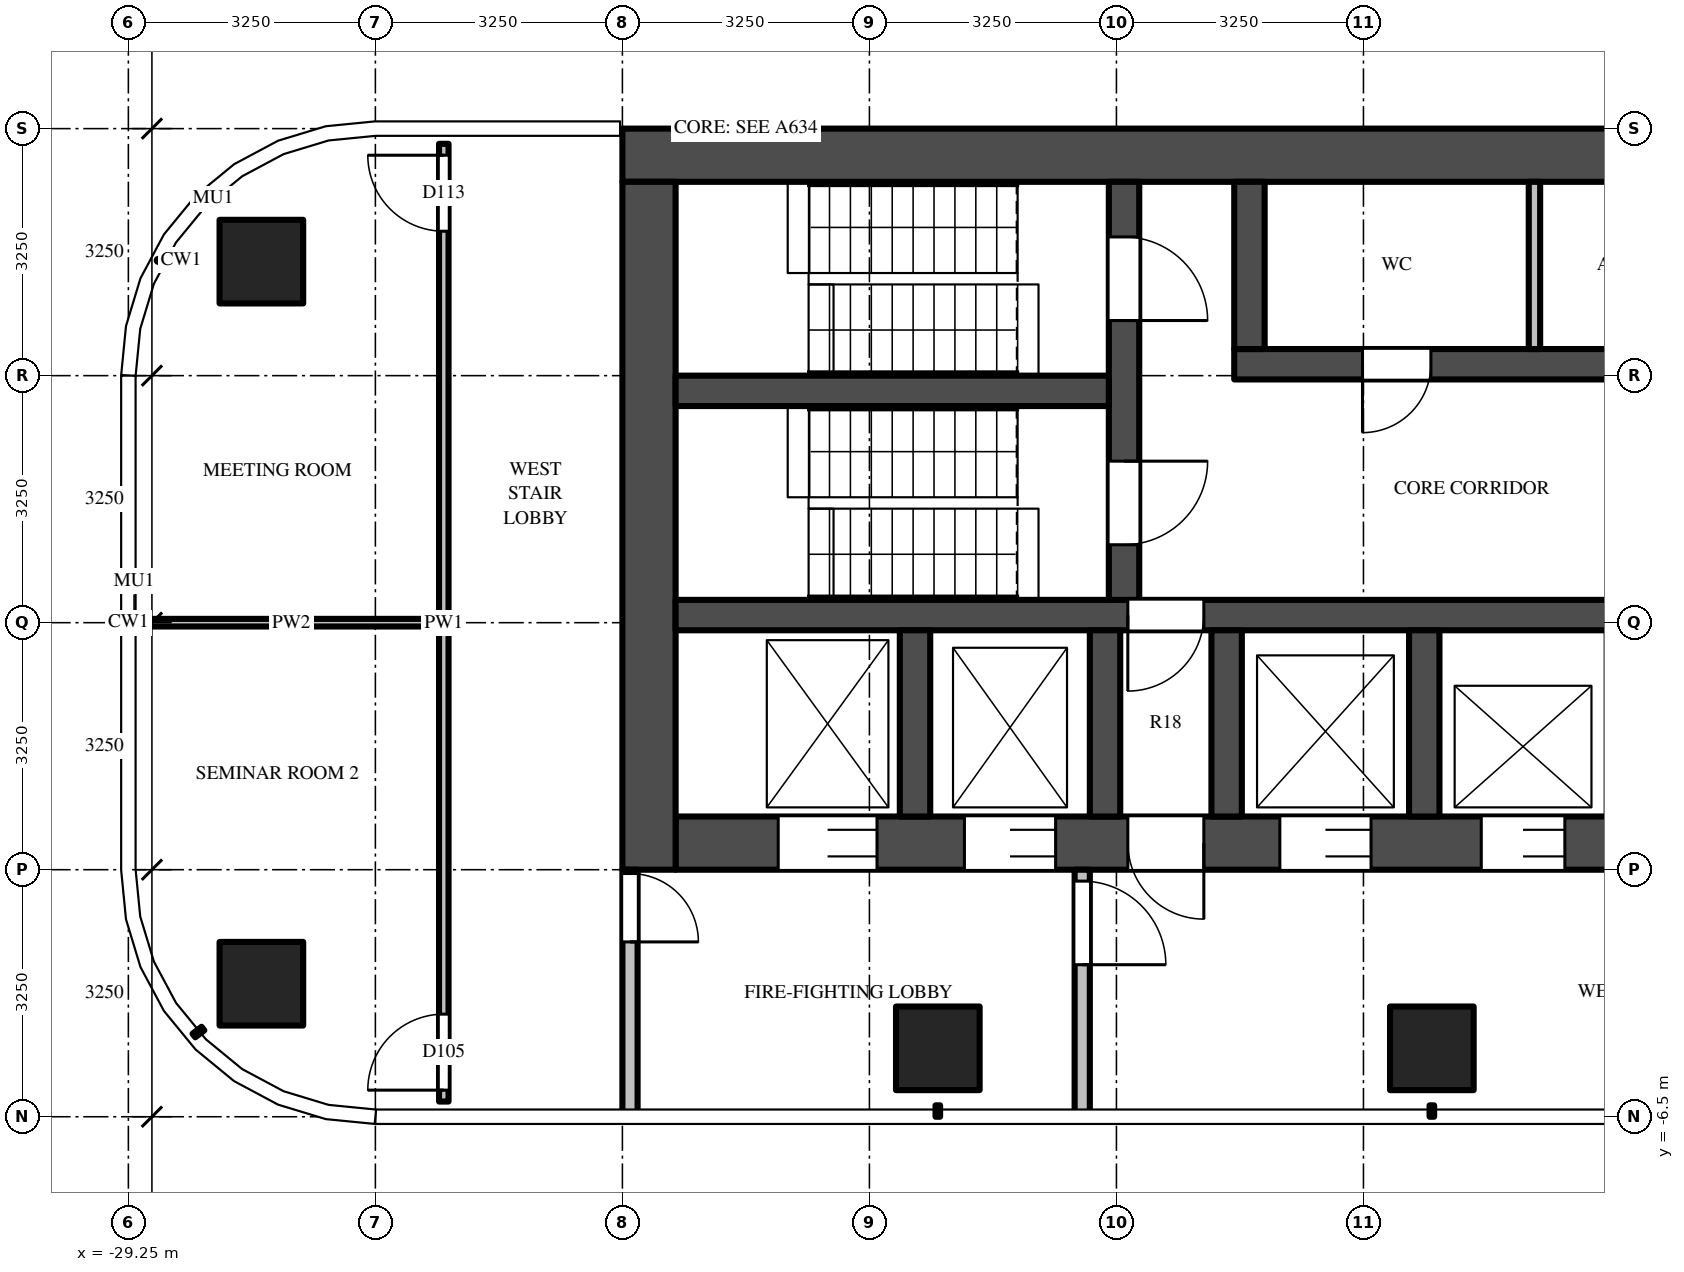
"""IFC4 building model, lengths in metres.
Left out: names, types, materials, properties, quantities, classifications, styles, units other than length and angle.
Written with IfcOpenShell. Run it as: python <this file> out.ifc"""

import sys

from ifc_helpers import new_model, si_unit, direction, frame, frame_2d, origin, origin_2d, place, context, subcontext, project, spatial, rectangle, extrude, source, transform, mapped, element, fill, save


model = new_model("IFC4")
c1 = context("Model", 3, precision=1e-05, world=origin(), true_north=direction((0.0, 1.0)))
c2 = subcontext(c1, "Body", "Model", "MODEL_VIEW")
j1 = project(units=[si_unit("LENGTHUNIT", "METRE"), si_unit("PLANEANGLEUNIT", "RADIAN")], contexts=[c1])
p1 = place(None, origin())
s1 = spatial("IfcSite", under=j1, at=p1, CompositionType="ELEMENT")
p2 = place(p1, origin())
s2 = spatial("IfcBuilding", under=s1, at=p2, CompositionType="ELEMENT")
p3 = place(p2, frame((0.0, 0.0, 267.5)))
s3 = spatial("IfcBuildingStorey", under=s2, at=p3, CompositionType="ELEMENT", Elevation=267.5)
m1 = source(origin(), c2, "Body", "SweptSolid", [
    extrude(rectangle(XDim=1.1, YDim=1.1, at=origin_2d()), origin(), (0.0, 0.0, 1.0), 3.9),
])
for number, where, z_axis, x_axis in (
    (1, (-12.1, -5.6, 0.0), (0.0, 0.0, 1.0), (1.0, 0.0, 0.0)),
    (2, (-18.6, -5.6, 0.0), (0.0, 0.0, 1.0), (1.0, 0.0, 0.0)),
    (3, (-27.5, -4.75, 0.0), (0.0, 0.0, 1.0), (1.0, 0.0, 0.0)),
    (4, (-27.5, 4.75, 0.0), (0.0, 0.0, 1.0), (1.0, 0.0, 0.0)),
):
    element("IfcColumn", number, at=place(p3, frame(where, z_axis=z_axis, x_axis=x_axis)), inside=s3, PredefinedType="COLUMN", context=c2, shape_type="MappedRepresentation", body=[
        mapped(m1, transform((0.0, 0.0, 0.0))),
    ])
m2 = source(origin(), c2, "Body", "SweptSolid", [
    extrude(rectangle(XDim=16.6, YDim=0.7, at=frame_2d((8.3, 0.0))), origin(), (0.0, 0.0, 1.0), 3.45),
])
p4 = place(p3, frame((-6.15, 6.15, 0.0), z_axis=(0.0, 0.0, 1.0), x_axis=(-1.0, 0.0, 0.0)))
e5 = element("IfcWall", 5, at=p4, inside=s3, PredefinedType="SHEAR", context=c2, shape_type="MappedRepresentation", body=[
    mapped(m2, transform((0.0, 0.0, 0.0))),
])
m3 = source(origin(), c2, "Body", "SweptSolid", [
    extrude(rectangle(XDim=14.85, YDim=0.7, at=frame_2d((7.425, 0.0))), origin(), (0.0, 0.0, 1.0), 3.45),
])
p5 = place(p3, frame((-7.2, -2.9, 0.0), z_axis=(0.0, 0.0, 1.0), x_axis=(-1.0, 0.0, 0.0)))
e6 = element("IfcWall", 6, at=p5, inside=s3, PredefinedType="SHEAR", context=c2, shape_type="MappedRepresentation", body=[
    mapped(m3, transform((0.0, 0.0, 0.0))),
])
m4 = source(origin(), c2, "Body", "SweptSolid", [
    extrude(rectangle(XDim=1.1, YDim=2.1, at=frame_2d((0.55, 1.05))), frame((0.0, 0.36, 0.0), z_axis=(0.0, -1.0, 0.0), x_axis=(1.0, 0.0, 0.0)), (0.0, 0.0, 1.0), 0.72),
])
p6 = place(p5, frame((0.55, 0.0, 0.0)))
e7 = element("IfcOpeningElement", 7, at=p6, cuts=e6, PredefinedType="OPENING", context=c2, shape_type="MappedRepresentation", body=[
    mapped(m4, transform((0.0, 0.0, 0.0))),
])
p7 = place(p5, frame((3.15, 0.0, 0.0)))
e8 = element("IfcOpeningElement", 8, at=p7, cuts=e6, PredefinedType="OPENING", context=c2, shape_type="MappedRepresentation", body=[
    mapped(m4, transform((0.0, 0.0, 0.0))),
])
m5 = source(origin(), c2, "Body", "SweptSolid", [
    extrude(rectangle(XDim=1.2, YDim=2.1, at=frame_2d((0.6, 1.05))), frame((0.0, 0.36, 0.0), z_axis=(0.0, -1.0, 0.0), x_axis=(1.0, 0.0, 0.0)), (0.0, 0.0, 1.0), 0.72),
])
p8 = place(p5, frame((5.7, 0.0, 0.0)))
e9 = element("IfcOpeningElement", 9, at=p8, cuts=e6, PredefinedType="OPENING", context=c2, shape_type="MappedRepresentation", body=[
    mapped(m5, transform((0.0, 0.0, 0.0))),
])
m6 = source(origin(), c2, "Body", "SweptSolid", [
    extrude(rectangle(XDim=1.3, YDim=2.1, at=frame_2d((0.65, 1.05))), frame((0.0, 0.36, 0.0), z_axis=(0.0, -1.0, 0.0), x_axis=(1.0, 0.0, 0.0)), (0.0, 0.0, 1.0), 0.72),
])
p9 = place(p5, frame((12.2, 0.0, 0.0)))
e10 = element("IfcOpeningElement", 10, at=p9, cuts=e6, PredefinedType="OPENING", context=c2, shape_type="MappedRepresentation", body=[
    mapped(m6, transform((0.0, 0.0, 0.0))),
])
p10 = place(p5, frame((9.85, 0.0, 0.0)))
e11 = element("IfcOpeningElement", 11, at=p10, cuts=e6, PredefinedType="OPENING", context=c2, shape_type="MappedRepresentation", body=[
    mapped(m5, transform((0.0, 0.0, 0.0))),
])
m7 = source(origin(), c2, "Body", "SweptSolid", [
    extrude(rectangle(XDim=1.0, YDim=2.1, at=frame_2d((0.5, 1.05))), frame((0.0, 0.36, 0.0), z_axis=(0.0, -1.0, 0.0), x_axis=(1.0, 0.0, 0.0)), (0.0, 0.0, 1.0), 0.72),
])
p11 = place(p5, frame((7.9, 0.0, 0.0)))
e12 = element("IfcOpeningElement", 12, at=p11, cuts=e6, PredefinedType="OPENING", context=c2, shape_type="MappedRepresentation", body=[
    mapped(m7, transform((0.0, 0.0, 0.0))),
])
m8 = source(origin(), c2, "Body", "SweptSolid", [
    extrude(rectangle(XDim=9.05, YDim=0.7, at=frame_2d((4.525, 0.0))), origin(), (0.0, 0.0, 1.0), 3.45),
])
p12 = place(p3, frame((-22.4, 5.8, 0.0), z_axis=(0.0, 0.0, 1.0), x_axis=(0.0, -1.0, 0.0)))
e13 = element("IfcWall", 13, at=p12, inside=s3, PredefinedType="SHEAR", context=c2, shape_type="MappedRepresentation", body=[
    mapped(m8, transform((0.0, 0.0, 0.0))),
])
m9 = source(origin(), c2, "Body", "SweptSolid", [
    extrude(rectangle(XDim=7.5, YDim=0.4, at=frame_2d((3.75, 0.0))), origin(), (0.0, 0.0, 1.0), 3.45),
])
p13 = place(p3, frame((-7.2, 3.4, 0.0), z_axis=(0.0, 0.0, 1.0), x_axis=(-1.0, 0.0, 0.0)))
e14 = element("IfcWall", 14, at=p13, inside=s3, PredefinedType="SHEAR", context=c2, shape_type="MappedRepresentation", body=[
    mapped(m9, transform((0.0, 0.0, 0.0))),
])
m10 = source(origin(), c2, "Body", "SweptSolid", [
    extrude(rectangle(XDim=1.0, YDim=2.1, at=frame_2d((0.5, 1.05))), frame((0.0, 0.21, 0.0), z_axis=(0.0, -1.0, 0.0), x_axis=(1.0, 0.0, 0.0)), (0.0, 0.0, 1.0), 0.42),
])
p14 = place(p13, frame((1.238, 0.0, 0.0)))
e15 = element("IfcOpeningElement", 15, at=p14, cuts=e14, PredefinedType="OPENING", context=c2, shape_type="MappedRepresentation", body=[
    mapped(m10, transform((0.0, 0.0, 0.0))),
])
m11 = source(origin(), c2, "Body", "SweptSolid", [
    extrude(rectangle(XDim=0.9, YDim=2.1, at=frame_2d((0.45, 1.05))), frame((0.0, 0.21, 0.0), z_axis=(0.0, -1.0, 0.0), x_axis=(1.0, 0.0, 0.0)), (0.0, 0.0, 1.0), 0.42),
])
p15 = place(p13, frame((4.913, 0.0, 0.0)))
e16 = element("IfcOpeningElement", 16, at=p15, cuts=e14, PredefinedType="OPENING", context=c2, shape_type="MappedRepresentation", body=[
    mapped(m11, transform((0.0, 0.0, 0.0))),
])
m12 = source(origin(), c2, "Body", "SweptSolid", [
    extrude(rectangle(XDim=14.85, YDim=0.4, at=frame_2d((7.425, 0.0))), origin(), (0.0, 0.0, 1.0), 3.45),
])
p16 = place(p3, frame((-7.2, 0.1, 0.0), z_axis=(0.0, 0.0, 1.0), x_axis=(-1.0, 0.0, 0.0)))
e17 = element("IfcWall", 17, at=p16, inside=s3, PredefinedType="SHEAR", context=c2, shape_type="MappedRepresentation", body=[
    mapped(m12, transform((0.0, 0.0, 0.0))),
])
p17 = place(p16, frame((7.9, 0.0, 0.0)))
e18 = element("IfcOpeningElement", 18, at=p17, cuts=e17, PredefinedType="OPENING", context=c2, shape_type="MappedRepresentation", body=[
    mapped(m10, transform((0.0, 0.0, 0.0))),
])
m13 = source(origin(), c2, "Body", "SweptSolid", [
    extrude(rectangle(XDim=5.5, YDim=0.4, at=frame_2d((2.75, 0.0))), origin(), (0.0, 0.0, 1.0), 3.45),
])
p18 = place(p3, frame((-16.15, 5.8, 0.0), z_axis=(0.0, 0.0, 1.0), x_axis=(0.0, -1.0, 0.0)))
e19 = element("IfcWall", 19, at=p18, inside=s3, PredefinedType="SHEAR", context=c2, shape_type="MappedRepresentation", body=[
    mapped(m13, transform((0.0, 0.0, 0.0))),
])
m14 = source(origin(), c2, "Body", "SweptSolid", [
    extrude(rectangle(XDim=1.1, YDim=2.1, at=frame_2d((0.55, 1.05))), frame((0.0, 0.21, 0.0), z_axis=(0.0, -1.0, 0.0), x_axis=(1.0, 0.0, 0.0)), (0.0, 0.0, 1.0), 0.42),
])
p19 = place(p18, frame((0.725, 0.0, 0.0)))
e20 = element("IfcOpeningElement", 20, at=p19, cuts=e19, PredefinedType="OPENING", context=c2, shape_type="MappedRepresentation", body=[
    mapped(m14, transform((0.0, 0.0, 0.0))),
])
p20 = place(p18, frame((3.675, 0.0, 0.0)))
e21 = element("IfcOpeningElement", 21, at=p20, cuts=e19, PredefinedType="OPENING", context=c2, shape_type="MappedRepresentation", body=[
    mapped(m14, transform((0.0, 0.0, 0.0))),
])
m15 = source(origin(), c2, "Body", "SweptSolid", [
    extrude(rectangle(XDim=5.7, YDim=0.4, at=frame_2d((2.85, 0.0))), origin(), (0.0, 0.0, 1.0), 3.45),
])
p21 = place(p3, frame((-16.35, 3.05, 0.0), z_axis=(0.0, 0.0, 1.0), x_axis=(-1.0, 0.0, 0.0)))
e22 = element("IfcWall", 22, at=p21, inside=s3, PredefinedType="SHEAR", context=c2, shape_type="MappedRepresentation", body=[
    mapped(m15, transform((0.0, 0.0, 0.0))),
])
m16 = source(origin(), c2, "Body", "SweptSolid", [
    extrude(rectangle(XDim=2.2, YDim=0.4, at=frame_2d((1.1, 0.0))), origin(), (0.0, 0.0, 1.0), 3.45),
])
p22 = place(p3, frame((-14.5, 5.8, 0.0), z_axis=(0.0, 0.0, 1.0), x_axis=(0.0, -1.0, 0.0)))
e23 = element("IfcWall", 23, at=p22, inside=s3, PredefinedType="SHEAR", context=c2, shape_type="MappedRepresentation", body=[
    mapped(m16, transform((0.0, 0.0, 0.0))),
])
m17 = source(origin(), c2, "Body", "SweptSolid", [
    extrude(rectangle(XDim=2.45, YDim=0.4, at=frame_2d((1.225, 0.0))), origin(), (0.0, 0.0, 1.0), 3.45),
])
for number, where, z_axis, x_axis in (
    (24, (-12.2, -0.1, 0.0), (0.0, 0.0, 1.0), (0.0, -1.0, 0.0)),
    (25, (-14.8, -0.1, 0.0), (0.0, 0.0, 1.0), (0.0, -1.0, 0.0)),
    (26, (-16.4, -0.1, 0.0), (0.0, 0.0, 1.0), (0.0, -1.0, 0.0)),
    (27, (-18.9, -0.1, 0.0), (0.0, 0.0, 1.0), (0.0, -1.0, 0.0)),
):
    element("IfcWall", number, at=place(p3, frame(where, z_axis=z_axis, x_axis=x_axis)), inside=s3, PredefinedType="SHEAR", context=c2, shape_type="MappedRepresentation", body=[
        mapped(m17, transform((0.0, 0.0, 0.0))),
    ])
m18 = source(origin(), c2, "Body", "SweptSolid", [
    extrude(rectangle(XDim=3.25, YDim=0.2, at=frame_2d((1.625, 0.0))), origin(), (0.0, 0.0, 1.0), 3.45),
])
p23 = place(p3, frame((-16.7, -3.25, 0.0), z_axis=(0.0, 0.0, 1.0), x_axis=(0.0, -1.0, 0.0)))
e28 = element("IfcWall", 28, at=p23, inside=s3, PredefinedType="PARTITIONING", context=c2, shape_type="MappedRepresentation", body=[
    mapped(m18, transform((0.0, 0.0, 0.0))),
])
m19 = source(origin(), c2, "Body", "SweptSolid", [
    extrude(rectangle(XDim=1.1, YDim=2.1, at=frame_2d((0.55, 1.05))), frame((0.0, 0.11, 0.0), z_axis=(0.0, -1.0, 0.0), x_axis=(1.0, 0.0, 0.0)), (0.0, 0.0, 1.0), 0.22),
])
p24 = place(p23, frame((0.15, 0.0, 0.0)))
e29 = element("IfcOpeningElement", 29, at=p24, cuts=e28, PredefinedType="OPENING", context=c2, shape_type="MappedRepresentation", body=[
    mapped(m19, transform((0.0, 0.0, 0.0))),
])
p25 = place(p3, frame((-22.65, -3.25, 0.0), z_axis=(0.0, 0.0, 1.0), x_axis=(0.0, -1.0, 0.0)))
e30 = element("IfcWall", 30, at=p25, inside=s3, PredefinedType="PARTITIONING", context=c2, shape_type="MappedRepresentation", body=[
    mapped(m18, transform((0.0, 0.0, 0.0))),
])
m20 = source(origin(), c2, "Body", "SweptSolid", [
    extrude(rectangle(XDim=0.9, YDim=2.1, at=frame_2d((0.45, 1.05))), frame((0.0, 0.11, 0.0), z_axis=(0.0, -1.0, 0.0), x_axis=(1.0, 0.0, 0.0)), (0.0, 0.0, 1.0), 0.22),
])
p26 = place(p25, frame((0.05, 0.0, 0.0)))
e31 = element("IfcOpeningElement", 31, at=p26, cuts=e30, PredefinedType="OPENING", context=c2, shape_type="MappedRepresentation", body=[
    mapped(m20, transform((0.0, 0.0, 0.0))),
])
m21 = source(origin(), c2, "Body", "SweptSolid", [
    extrude(rectangle(XDim=2.2, YDim=0.15, at=frame_2d((1.1, 0.0))), origin(), (0.0, 0.0, 1.0), 3.45),
])
p27 = place(p3, frame((-10.75, 5.8, 0.0), z_axis=(0.0, 0.0, 1.0), x_axis=(0.0, -1.0, 0.0)))
e32 = element("IfcWall", 32, at=p27, inside=s3, PredefinedType="PARTITIONING", context=c2, shape_type="MappedRepresentation", body=[
    mapped(m21, transform((0.0, 0.0, 0.0))),
])
m22 = source(origin(), c2, "Body", "SweptSolid", [
    extrude(rectangle(XDim=12.6, YDim=0.125, at=frame_2d((6.3, 0.0))), origin(), (0.0, 0.0, 1.0), 2.53),
])
p28 = place(p3, frame((-25.1, -6.3, 0.0), z_axis=(0.0, 0.0, 1.0), x_axis=(0.0, 1.0, 0.0)))
e33 = element("IfcWall", 33, at=p28, inside=s3, PredefinedType="PARTITIONING", context=c2, shape_type="MappedRepresentation", body=[
    mapped(m22, transform((0.0, 0.0, 0.0))),
])
m23 = source(origin(), c2, "Body", "SweptSolid", [
    extrude(rectangle(XDim=1.0, YDim=2.1, at=frame_2d((0.5, 1.05))), frame((0.0, 0.073, 0.0), z_axis=(0.0, -1.0, 0.0), x_axis=(1.0, 0.0, 0.0)), (0.0, 0.0, 1.0), 0.145),
])
p29 = place(p28, frame((0.15, 0.0, 0.0)))
e34 = element("IfcOpeningElement", 34, at=p29, cuts=e33, PredefinedType="OPENING", context=c2, shape_type="MappedRepresentation", body=[
    mapped(m23, transform((0.0, 0.0, 0.0))),
])
p30 = place(p28, frame((11.45, 0.0, 0.0)))
e35 = element("IfcOpeningElement", 35, at=p30, cuts=e33, PredefinedType="OPENING", context=c2, shape_type="MappedRepresentation", body=[
    mapped(m23, transform((0.0, 0.0, 0.0))),
])
m24 = source(origin(), c2, "Body", "SweptSolid", [
    extrude(rectangle(XDim=3.887, YDim=0.1, at=frame_2d((1.944, 0.0))), origin(), (0.0, 0.0, 1.0), 2.53),
])
p31 = place(p3, frame((-29.05, 0.0, 0.0), z_axis=(0.0, 0.0, 1.0), x_axis=(1.0, 0.0, 0.0)))
e36 = element("IfcWall", 36, at=p31, inside=s3, PredefinedType="PARTITIONING", context=c2, shape_type="MappedRepresentation", body=[
    mapped(m24, transform((0.0, 0.0, 0.0))),
])
m25 = source(origin(), c2, "Body", "SweptSolid", [
    extrude(rectangle(XDim=1.1, YDim=2.1, at=frame_2d((0.55, 1.05))), frame((0.0, -0.275, 0.0), z_axis=(0.0, -1.0, 0.0), x_axis=(1.0, 0.0, 0.0)), (0.0, 0.0, 1.0), 0.05),
])
p32 = place(p7, origin())
e37 = element("IfcDoor", 37, at=p32, inside=s3, OperationType="DOUBLE_DOOR_SLIDING", PredefinedType="DOOR", context=c2, shape_type="MappedRepresentation", body=[
    mapped(m25, transform((0.0, 0.0, 0.0))),
])
fill(e8, e37)
m26 = source(origin(), c2, "Body", "SweptSolid", [
    extrude(rectangle(XDim=1.2, YDim=2.1, at=frame_2d((0.6, 1.05))), frame((0.0, -0.275, 0.0), z_axis=(0.0, -1.0, 0.0), x_axis=(1.0, 0.0, 0.0)), (0.0, 0.0, 1.0), 0.05),
])
p33 = place(p8, origin())
e38 = element("IfcDoor", 38, at=p33, inside=s3, OperationType="DOUBLE_DOOR_SLIDING", PredefinedType="DOOR", context=c2, shape_type="MappedRepresentation", body=[
    mapped(m26, transform((0.0, 0.0, 0.0))),
])
fill(e9, e38)
m27 = source(origin(), c2, "Body", "SweptSolid", [
    extrude(rectangle(XDim=1.3, YDim=2.1, at=frame_2d((0.65, 1.05))), frame((0.0, -0.275, 0.0), z_axis=(0.0, -1.0, 0.0), x_axis=(1.0, 0.0, 0.0)), (0.0, 0.0, 1.0), 0.05),
])
p34 = place(p9, origin())
e39 = element("IfcDoor", 39, at=p34, inside=s3, OperationType="DOUBLE_DOOR_SLIDING", PredefinedType="DOOR", context=c2, shape_type="MappedRepresentation", body=[
    mapped(m27, transform((0.0, 0.0, 0.0))),
])
fill(e10, e39)
p35 = place(p10, origin())
e40 = element("IfcDoor", 40, at=p35, inside=s3, OperationType="DOUBLE_DOOR_SLIDING", PredefinedType="DOOR", context=c2, shape_type="MappedRepresentation", body=[
    mapped(m26, transform((0.0, 0.0, 0.0))),
])
fill(e11, e40)
m28 = source(origin(), c2, "Body", "SweptSolid", [
    extrude(rectangle(XDim=1.1, YDim=2.1, at=frame_2d((0.55, 1.05))), frame((0.0, 0.025, 0.0), z_axis=(0.0, -1.0, 0.0), x_axis=(1.0, 0.0, 0.0)), (0.0, 0.0, 1.0), 0.05),
])
p36 = place(p19, origin())
e41 = element("IfcDoor", 41, at=p36, inside=s3, OperationType="SINGLE_SWING_RIGHT", PredefinedType="DOOR", context=c2, shape_type="MappedRepresentation", body=[
    mapped(m28, transform((0.0, 0.0, 0.0))),
])
fill(e20, e41)
p37 = place(p20, origin())
e42 = element("IfcDoor", 42, at=p37, inside=s3, OperationType="SINGLE_SWING_LEFT", PredefinedType="DOOR", context=c2, shape_type="MappedRepresentation", body=[
    mapped(m28, transform((0.0, 0.0, 0.0))),
])
fill(e21, e42)
m29 = source(origin(), c2, "Body", "SweptSolid", [
    extrude(rectangle(XDim=1.0, YDim=2.1, at=frame_2d((0.5, 1.05))), frame((0.0, 0.025, 0.0), z_axis=(0.0, -1.0, 0.0), x_axis=(1.0, 0.0, 0.0)), (0.0, 0.0, 1.0), 0.05),
])
p38 = place(p17, origin())
e43 = element("IfcDoor", 43, at=p38, inside=s3, OperationType="SINGLE_SWING_RIGHT", PredefinedType="DOOR", context=c2, shape_type="MappedRepresentation", body=[
    mapped(m29, transform((0.0, 0.0, 0.0))),
])
fill(e18, e43)
m30 = source(origin(), c2, "Body", "SweptSolid", [
    extrude(rectangle(XDim=1.0, YDim=2.1, at=frame_2d((0.5, 1.05))), frame((0.0, -0.275, 0.0), z_axis=(0.0, -1.0, 0.0), x_axis=(1.0, 0.0, 0.0)), (0.0, 0.0, 1.0), 0.05),
])
p39 = place(p11, origin())
e44 = element("IfcDoor", 44, at=p39, inside=s3, OperationType="SINGLE_SWING_LEFT", PredefinedType="DOOR", context=c2, shape_type="MappedRepresentation", body=[
    mapped(m30, transform((0.0, 0.0, 0.0))),
])
fill(e12, e44)
p40 = place(p24, origin())
e45 = element("IfcDoor", 45, at=p40, inside=s3, OperationType="SINGLE_SWING_RIGHT", PredefinedType="DOOR", context=c2, shape_type="MappedRepresentation", body=[
    mapped(m28, transform((0.0, 0.0, 0.0))),
])
fill(e29, e45)
m31 = source(origin(), c2, "Body", "SweptSolid", [
    extrude(rectangle(XDim=0.9, YDim=2.1, at=frame_2d((0.45, 1.05))), frame((0.0, 0.025, 0.0), z_axis=(0.0, -1.0, 0.0), x_axis=(1.0, 0.0, 0.0)), (0.0, 0.0, 1.0), 0.05),
])
p41 = place(p26, origin())
e46 = element("IfcDoor", 46, at=p41, inside=s3, OperationType="SINGLE_SWING_RIGHT", PredefinedType="DOOR", context=c2, shape_type="MappedRepresentation", body=[
    mapped(m31, transform((0.0, 0.0, 0.0))),
])
fill(e31, e46)
p42 = place(p15, origin())
e47 = element("IfcDoor", 47, at=p42, inside=s3, OperationType="SINGLE_SWING_RIGHT", PredefinedType="DOOR", context=c2, shape_type="MappedRepresentation", body=[
    mapped(m31, transform((0.0, 0.0, 0.0))),
])
fill(e16, e47)
p43 = place(p29, origin())
e48 = element("IfcDoor", 48, at=p43, inside=s3, OperationType="SINGLE_SWING_LEFT", PredefinedType="DOOR", context=c2, shape_type="MappedRepresentation", body=[
    mapped(m29, transform((0.0, 0.0, 0.0))),
])
fill(e34, e48)
p44 = place(p30, origin())
e49 = element("IfcDoor", 49, at=p44, inside=s3, OperationType="SINGLE_SWING_RIGHT", PredefinedType="DOOR", context=c2, shape_type="MappedRepresentation", body=[
    mapped(m29, transform((0.0, 0.0, 0.0))),
])
fill(e35, e49)
save(model, sys.argv[1])
